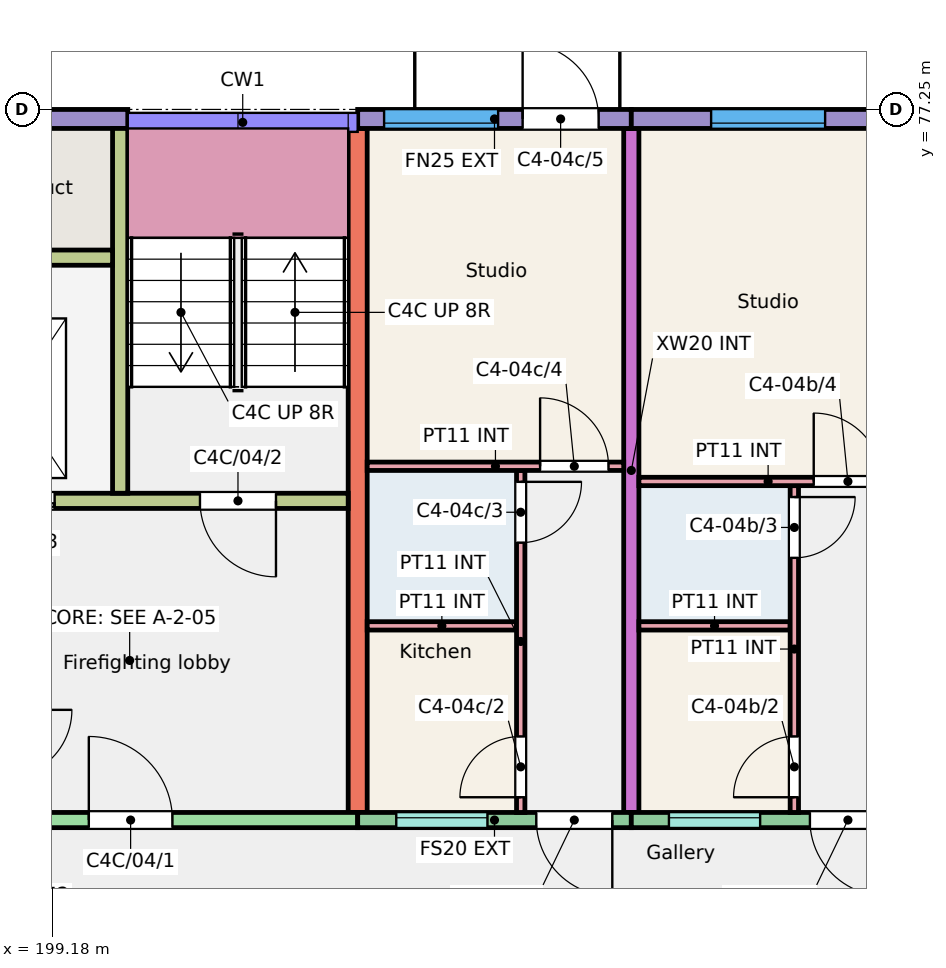
"""IFC4 building model, lengths in metres.
Left out: names, types, materials, properties, quantities, classifications, styles, units other than length and angle.
Written with IfcOpenShell. Run it as: python <this file> out.ifc"""

import sys

from ifc_helpers import new_model, si_unit, direction, frame, frame_2d, origin, place, context, subcontext, project, spatial, rectangle, extrude, element, fill, save


model = new_model("IFC4")
c1 = context("Model", 3, precision=1e-05, world=origin(), true_north=direction((0.0, 1.0)))
c2 = subcontext(c1, "Body", "Model", "MODEL_VIEW")
j1 = project(units=[si_unit("LENGTHUNIT", "METRE"), si_unit("PLANEANGLEUNIT", "RADIAN")], contexts=[c1])
p1 = place(None, origin())
s1 = spatial("IfcSite", under=j1, at=p1, CompositionType="ELEMENT")
p2 = place(p1, origin())
s2 = spatial("IfcBuilding", under=s1, at=p2, CompositionType="ELEMENT")
p3 = place(p2, frame((0.0, 0.0, 12.0)))
s3 = spatial("IfcBuildingStorey", under=s2, at=p3, CompositionType="ELEMENT", Elevation=12.0)
p4 = place(p3, frame((203.2, 68.0, 0.0), z_axis=(0.0, 0.0, 1.0), x_axis=(0.0, 1.0, 0.0)))
e1 = element("IfcWall", 1, at=p4, inside=s3, PredefinedType="SHEAR", context=c2, shape_type="SweptSolid", body=[
    extrude(rectangle(XDim=9.0, YDim=0.25, at=frame_2d((4.5, 0.0))), origin(), (0.0, 0.0, 1.0), 3.0),
])
p5 = place(p3, frame((206.8, 68.0, 0.0), z_axis=(0.0, 0.0, 1.0), x_axis=(0.0, 1.0, 0.0)))
e2 = element("IfcWall", 2, at=p5, inside=s3, PredefinedType="SHEAR", context=c2, shape_type="SweptSolid", body=[
    extrude(rectangle(XDim=9.0, YDim=0.2, at=frame_2d((4.5, 0.0))), origin(), (0.0, 0.0, 1.0), 3.0),
])
p6 = place(p3, frame((197.2, 77.125, 0.0), z_axis=(0.0, 0.0, 1.0), x_axis=(1.0, 0.0, 0.0)))
e3 = element("IfcWall", 3, at=p6, inside=s3, PredefinedType="SOLIDWALL", context=c2, shape_type="SweptSolid", body=[
    extrude(rectangle(XDim=2.975, YDim=0.25, at=frame_2d((1.488, 0.0))), origin(), (0.0, 0.0, 1.0), 3.0),
])
p7 = place(p3, frame((197.35, 67.9, 0.0), z_axis=(0.0, 0.0, 1.0), x_axis=(1.0, 0.0, 0.0)))
e4 = element("IfcWall", 4, at=p7, inside=s3, PredefinedType="SHEAR", context=c2, shape_type="SweptSolid", body=[
    extrude(rectangle(XDim=5.85, YDim=0.2, at=frame_2d((2.925, 0.0))), origin(), (0.0, 0.0, 1.0), 3.0),
])
p8 = place(p7, frame((2.312, 0.0, 0.0)))
e5 = element("IfcOpeningElement", 5, at=p8, cuts=e4, PredefinedType="OPENING", context=c2, shape_type="SweptSolid", body=[
    extrude(rectangle(XDim=1.1, YDim=2.1, at=frame_2d((0.55, 1.05))), frame((0.0, 0.11, 0.0), z_axis=(0.0, -1.0, 0.0), x_axis=(1.0, 0.0, 0.0)), (0.0, 0.0, 1.0), 0.22),
])
p9 = place(p3, frame((197.35, 72.1, 0.0), z_axis=(0.0, 0.0, 1.0), x_axis=(1.0, 0.0, 0.0)))
e6 = element("IfcWall", 6, at=p9, inside=s3, PredefinedType="SHEAR", context=c2, shape_type="SweptSolid", body=[
    extrude(rectangle(XDim=5.725, YDim=0.2, at=frame_2d((2.862, 0.0))), origin(), (0.0, 0.0, 1.0), 3.0),
])
p10 = place(p9, frame((3.775, 0.0, 0.0)))
e7 = element("IfcOpeningElement", 7, at=p10, cuts=e6, PredefinedType="OPENING", context=c2, shape_type="SweptSolid", body=[
    extrude(rectangle(XDim=1.0, YDim=2.1, at=frame_2d((0.5, 1.05))), frame((0.0, 0.11, 0.0), z_axis=(0.0, -1.0, 0.0), x_axis=(1.0, 0.0, 0.0)), (0.0, 0.0, 1.0), 0.22),
])
p11 = place(p9, frame((0.762, 0.0, 0.0)))
e8 = element("IfcOpeningElement", 8, at=p11, cuts=e6, PredefinedType="OPENING", context=c2, shape_type="SweptSolid", body=[
    extrude(rectangle(XDim=1.1, YDim=2.1, at=frame_2d((0.55, 1.05))), frame((0.0, 0.11, 0.0), z_axis=(0.0, -1.0, 0.0), x_axis=(1.0, 0.0, 0.0)), (0.0, 0.0, 1.0), 0.22),
])
p12 = place(p3, frame((200.075, 72.2, 0.0), z_axis=(0.0, 0.0, 1.0), x_axis=(0.0, 1.0, 0.0)))
e9 = element("IfcWall", 9, at=p12, inside=s3, PredefinedType="SHEAR", context=c2, shape_type="SweptSolid", body=[
    extrude(rectangle(XDim=4.8, YDim=0.2, at=frame_2d((2.4, 0.0))), origin(), (0.0, 0.0, 1.0), 3.0),
])
p13 = place(p3, frame((197.35, 75.3, 0.0), z_axis=(0.0, 0.0, 1.0), x_axis=(1.0, 0.0, 0.0)))
e10 = element("IfcWall", 10, at=p13, inside=s3, PredefinedType="SHEAR", context=c2, shape_type="SweptSolid", body=[
    extrude(rectangle(XDim=2.625, YDim=0.2, at=frame_2d((1.312, 0.0))), origin(), (0.0, 0.0, 1.0), 3.0),
])
p14 = place(p3, frame((203.2, 77.125, 0.0), z_axis=(0.0, 0.0, 1.0), x_axis=(1.0, 0.0, 0.0)))
e11 = element("IfcWall", 11, at=p14, inside=s3, PredefinedType="SOLIDWALL", context=c2, shape_type="SweptSolid", body=[
    extrude(rectangle(XDim=3.6, YDim=0.25, at=frame_2d((1.8, 0.0))), origin(), (0.0, 0.0, 1.0), 3.0),
])
p15 = place(p14, frame((0.347, 0.0, 0.9)))
e12 = element("IfcOpeningElement", 12, at=p15, cuts=e11, PredefinedType="OPENING", context=c2, shape_type="SweptSolid", body=[
    extrude(rectangle(XDim=1.5, YDim=1.5, at=frame_2d((0.75, 0.75))), frame((0.0, 0.135, 0.0), z_axis=(0.0, -1.0, 0.0), x_axis=(1.0, 0.0, 0.0)), (0.0, 0.0, 1.0), 0.27),
])
p16 = place(p14, frame((2.17, 0.0, 0.0)))
e13 = element("IfcOpeningElement", 13, at=p16, cuts=e11, PredefinedType="OPENING", context=c2, shape_type="SweptSolid", body=[
    extrude(rectangle(XDim=1.0, YDim=2.1, at=frame_2d((0.5, 1.05))), frame((0.0, 0.135, 0.0), z_axis=(0.0, -1.0, 0.0), x_axis=(1.0, 0.0, 0.0)), (0.0, 0.0, 1.0), 0.27),
])
p17 = place(p3, frame((203.2, 67.9, 0.0), z_axis=(0.0, 0.0, 1.0), x_axis=(1.0, 0.0, 0.0)))
e14 = element("IfcWall", 14, at=p17, inside=s3, PredefinedType="SOLIDWALL", context=c2, shape_type="SweptSolid", body=[
    extrude(rectangle(XDim=3.6, YDim=0.2, at=frame_2d((1.8, 0.0))), origin(), (0.0, 0.0, 1.0), 3.0),
])
p18 = place(p17, frame((0.508, 0.0, 1.1)))
e15 = element("IfcOpeningElement", 15, at=p18, cuts=e14, PredefinedType="OPENING", context=c2, shape_type="SweptSolid", body=[
    extrude(rectangle(XDim=1.2, YDim=1.3, at=frame_2d((0.6, 0.65))), frame((0.0, 0.11, 0.0), z_axis=(0.0, -1.0, 0.0), x_axis=(1.0, 0.0, 0.0)), (0.0, 0.0, 1.0), 0.22),
])
p19 = place(p17, frame((2.35, 0.0, 0.0)))
e16 = element("IfcOpeningElement", 16, at=p19, cuts=e14, PredefinedType="OPENING", context=c2, shape_type="SweptSolid", body=[
    extrude(rectangle(XDim=1.0, YDim=2.1, at=frame_2d((0.5, 1.05))), frame((0.0, 0.11, 0.0), z_axis=(0.0, -1.0, 0.0), x_axis=(1.0, 0.0, 0.0)), (0.0, 0.0, 1.0), 0.22),
])
p20 = place(p3, frame((206.8, 77.125, 0.0), z_axis=(0.0, 0.0, 1.0), x_axis=(1.0, 0.0, 0.0)))
e17 = element("IfcWall", 17, at=p20, inside=s3, PredefinedType="SOLIDWALL", context=c2, shape_type="SweptSolid", body=[
    extrude(rectangle(XDim=3.6, YDim=0.25, at=frame_2d((1.8, 0.0))), origin(), (0.0, 0.0, 1.0), 3.0),
])
p21 = place(p20, frame((1.05, 0.0, 0.9)))
e18 = element("IfcOpeningElement", 18, at=p21, cuts=e17, PredefinedType="OPENING", context=c2, shape_type="SweptSolid", body=[
    extrude(rectangle(XDim=1.5, YDim=1.5, at=frame_2d((0.75, 0.75))), frame((0.0, 0.135, 0.0), z_axis=(0.0, -1.0, 0.0), x_axis=(1.0, 0.0, 0.0)), (0.0, 0.0, 1.0), 0.27),
])
p22 = place(p3, frame((206.8, 67.9, 0.0), z_axis=(0.0, 0.0, 1.0), x_axis=(1.0, 0.0, 0.0)))
e19 = element("IfcWall", 19, at=p22, inside=s3, PredefinedType="SOLIDWALL", context=c2, shape_type="SweptSolid", body=[
    extrude(rectangle(XDim=3.6, YDim=0.2, at=frame_2d((1.8, 0.0))), origin(), (0.0, 0.0, 1.0), 3.0),
])
p23 = place(p22, frame((0.495, 0.0, 1.1)))
e20 = element("IfcOpeningElement", 20, at=p23, cuts=e19, PredefinedType="OPENING", context=c2, shape_type="SweptSolid", body=[
    extrude(rectangle(XDim=1.2, YDim=1.3, at=frame_2d((0.6, 0.65))), frame((0.0, 0.11, 0.0), z_axis=(0.0, -1.0, 0.0), x_axis=(1.0, 0.0, 0.0)), (0.0, 0.0, 1.0), 0.22),
])
p24 = place(p22, frame((2.35, 0.0, 0.0)))
e21 = element("IfcOpeningElement", 21, at=p24, cuts=e19, PredefinedType="OPENING", context=c2, shape_type="SweptSolid", body=[
    extrude(rectangle(XDim=1.0, YDim=2.1, at=frame_2d((0.5, 1.05))), frame((0.0, 0.11, 0.0), z_axis=(0.0, -1.0, 0.0), x_axis=(1.0, 0.0, 0.0)), (0.0, 0.0, 1.0), 0.22),
])
p25 = place(p3, frame((206.9, 70.455, 0.0), z_axis=(0.0, 0.0, 1.0), x_axis=(1.0, 0.0, 0.0)))
e22 = element("IfcWall", 22, at=p25, inside=s3, PredefinedType="PARTITIONING", context=c2, shape_type="SweptSolid", body=[
    extrude(rectangle(XDim=1.99, YDim=0.11, at=frame_2d((0.995, 0.0))), origin(), (0.0, 0.0, 1.0), 2.8),
])
p26 = place(p3, frame((208.945, 68.0, 0.0), z_axis=(0.0, 0.0, 1.0), x_axis=(0.0, 1.0, 0.0)))
e23 = element("IfcWall", 23, at=p26, inside=s3, PredefinedType="PARTITIONING", context=c2, shape_type="SweptSolid", body=[
    extrude(rectangle(XDim=4.3, YDim=0.11, at=frame_2d((2.15, 0.0))), origin(), (0.0, 0.0, 1.0), 2.8),
])
p27 = place(p26, frame((0.2, 0.0, 0.0)))
e24 = element("IfcOpeningElement", 24, at=p27, cuts=e23, PredefinedType="OPENING", context=c2, shape_type="SweptSolid", body=[
    extrude(rectangle(XDim=0.8, YDim=2.1, at=frame_2d((0.4, 1.05))), frame((0.0, 0.065, 0.0), z_axis=(0.0, -1.0, 0.0), x_axis=(1.0, 0.0, 0.0)), (0.0, 0.0, 1.0), 0.13),
])
p28 = place(p26, frame((3.35, 0.0, 0.0)))
e25 = element("IfcOpeningElement", 25, at=p28, cuts=e23, PredefinedType="OPENING", context=c2, shape_type="SweptSolid", body=[
    extrude(rectangle(XDim=0.8, YDim=2.1, at=frame_2d((0.4, 1.05))), frame((0.0, 0.065, 0.0), z_axis=(0.0, -1.0, 0.0), x_axis=(1.0, 0.0, 0.0)), (0.0, 0.0, 1.0), 0.13),
])
p29 = place(p3, frame((206.9, 72.355, 0.0), z_axis=(0.0, 0.0, 1.0), x_axis=(1.0, 0.0, 0.0)))
e26 = element("IfcWall", 26, at=p29, inside=s3, PredefinedType="PARTITIONING", context=c2, shape_type="SweptSolid", body=[
    extrude(rectangle(XDim=3.4, YDim=0.11, at=frame_2d((1.7, 0.0))), origin(), (0.0, 0.0, 1.0), 2.8),
])
p30 = place(p29, frame((2.3, 0.0, 0.0)))
e27 = element("IfcOpeningElement", 27, at=p30, cuts=e26, PredefinedType="OPENING", context=c2, shape_type="SweptSolid", body=[
    extrude(rectangle(XDim=0.9, YDim=2.1, at=frame_2d((0.45, 1.05))), frame((0.0, 0.065, 0.0), z_axis=(0.0, -1.0, 0.0), x_axis=(1.0, 0.0, 0.0)), (0.0, 0.0, 1.0), 0.13),
])
p31 = place(p3, frame((203.325, 70.455, 0.0), z_axis=(0.0, 0.0, 1.0), x_axis=(1.0, 0.0, 0.0)))
e28 = element("IfcWall", 28, at=p31, inside=s3, PredefinedType="PARTITIONING", context=c2, shape_type="SweptSolid", body=[
    extrude(rectangle(XDim=1.965, YDim=0.11, at=frame_2d((0.982, 0.0))), origin(), (0.0, 0.0, 1.0), 2.8),
])
p32 = place(p3, frame((205.345, 68.0, 0.0), z_axis=(0.0, 0.0, 1.0), x_axis=(0.0, 1.0, 0.0)))
e29 = element("IfcWall", 29, at=p32, inside=s3, PredefinedType="PARTITIONING", context=c2, shape_type="SweptSolid", body=[
    extrude(rectangle(XDim=4.5, YDim=0.11, at=frame_2d((2.25, 0.0))), origin(), (0.0, 0.0, 1.0), 2.8),
])
p33 = place(p32, frame((0.2, 0.0, 0.0)))
e30 = element("IfcOpeningElement", 30, at=p33, cuts=e29, PredefinedType="OPENING", context=c2, shape_type="SweptSolid", body=[
    extrude(rectangle(XDim=0.8, YDim=2.1, at=frame_2d((0.4, 1.05))), frame((0.0, 0.065, 0.0), z_axis=(0.0, -1.0, 0.0), x_axis=(1.0, 0.0, 0.0)), (0.0, 0.0, 1.0), 0.13),
])
p34 = place(p32, frame((3.55, 0.0, 0.0)))
e31 = element("IfcOpeningElement", 31, at=p34, cuts=e29, PredefinedType="OPENING", context=c2, shape_type="SweptSolid", body=[
    extrude(rectangle(XDim=0.8, YDim=2.1, at=frame_2d((0.4, 1.05))), frame((0.0, 0.065, 0.0), z_axis=(0.0, -1.0, 0.0), x_axis=(1.0, 0.0, 0.0)), (0.0, 0.0, 1.0), 0.13),
])
p35 = place(p3, frame((203.325, 72.555, 0.0), z_axis=(0.0, 0.0, 1.0), x_axis=(1.0, 0.0, 0.0)))
e32 = element("IfcWall", 32, at=p35, inside=s3, PredefinedType="PARTITIONING", context=c2, shape_type="SweptSolid", body=[
    extrude(rectangle(XDim=3.375, YDim=0.11, at=frame_2d((1.688, 0.0))), origin(), (0.0, 0.0, 1.0), 2.8),
])
p36 = place(p35, frame((2.275, 0.0, 0.0)))
e33 = element("IfcOpeningElement", 33, at=p36, cuts=e32, PredefinedType="OPENING", context=c2, shape_type="SweptSolid", body=[
    extrude(rectangle(XDim=0.9, YDim=2.1, at=frame_2d((0.45, 1.05))), frame((0.0, 0.065, 0.0), z_axis=(0.0, -1.0, 0.0), x_axis=(1.0, 0.0, 0.0)), (0.0, 0.0, 1.0), 0.13),
])
p37 = place(p23, origin())
e34 = element("IfcWindow", 34, at=p37, inside=s3, PartitioningType="SINGLE_PANEL", PredefinedType="WINDOW", context=c2, shape_type="SweptSolid", body=[
    extrude(rectangle(XDim=1.2, YDim=1.3, at=frame_2d((0.6, 0.65))), frame((0.0, 0.06, 0.0), z_axis=(0.0, -1.0, 0.0), x_axis=(1.0, 0.0, 0.0)), (0.0, 0.0, 1.0), 0.06),
])
fill(e20, e34)
p38 = place(p21, origin())
e35 = element("IfcWindow", 35, at=p38, inside=s3, PartitioningType="SINGLE_PANEL", PredefinedType="WINDOW", context=c2, shape_type="SweptSolid", body=[
    extrude(rectangle(XDim=1.5, YDim=1.5, at=frame_2d((0.75, 0.75))), frame((0.0, -0.025, 0.0), z_axis=(0.0, -1.0, 0.0), x_axis=(1.0, 0.0, 0.0)), (0.0, 0.0, 1.0), 0.06),
])
fill(e18, e35)
p39 = place(p18, origin())
e36 = element("IfcWindow", 36, at=p39, inside=s3, PartitioningType="SINGLE_PANEL", PredefinedType="WINDOW", context=c2, shape_type="SweptSolid", body=[
    extrude(rectangle(XDim=1.2, YDim=1.3, at=frame_2d((0.6, 0.65))), frame((0.0, 0.06, 0.0), z_axis=(0.0, -1.0, 0.0), x_axis=(1.0, 0.0, 0.0)), (0.0, 0.0, 1.0), 0.06),
])
fill(e15, e36)
p40 = place(p15, origin())
e37 = element("IfcWindow", 37, at=p40, inside=s3, PartitioningType="SINGLE_PANEL", PredefinedType="WINDOW", context=c2, shape_type="SweptSolid", body=[
    extrude(rectangle(XDim=1.5, YDim=1.5, at=frame_2d((0.75, 0.75))), frame((0.0, -0.025, 0.0), z_axis=(0.0, -1.0, 0.0), x_axis=(1.0, 0.0, 0.0)), (0.0, 0.0, 1.0), 0.06),
])
fill(e12, e37)
p41 = place(p24, origin())
e38 = element("IfcDoor", 38, at=p41, inside=s3, OperationType="SINGLE_SWING_RIGHT", PredefinedType="DOOR", context=c2, shape_type="SweptSolid", body=[
    extrude(rectangle(XDim=1.0, YDim=2.1, at=frame_2d((0.5, 1.05))), frame((0.0, 0.025, 0.0), z_axis=(0.0, -1.0, 0.0), x_axis=(1.0, 0.0, 0.0)), (0.0, 0.0, 1.0), 0.05),
])
fill(e21, e38)
p42 = place(p27, origin())
e39 = element("IfcDoor", 39, at=p42, inside=s3, OperationType="SINGLE_SWING_LEFT", PredefinedType="DOOR", context=c2, shape_type="SweptSolid", body=[
    extrude(rectangle(XDim=0.8, YDim=2.1, at=frame_2d((0.4, 1.05))), frame((0.0, 0.025, 0.0), z_axis=(0.0, -1.0, 0.0), x_axis=(1.0, 0.0, 0.0)), (0.0, 0.0, 1.0), 0.05),
])
fill(e24, e39)
p43 = place(p28, origin())
e40 = element("IfcDoor", 40, at=p43, inside=s3, OperationType="SINGLE_SWING_RIGHT", PredefinedType="DOOR", context=c2, shape_type="SweptSolid", body=[
    extrude(rectangle(XDim=0.8, YDim=2.1, at=frame_2d((0.4, 1.05))), frame((0.0, 0.025, 0.0), z_axis=(0.0, -1.0, 0.0), x_axis=(1.0, 0.0, 0.0)), (0.0, 0.0, 1.0), 0.05),
])
fill(e25, e40)
p44 = place(p30, origin())
e41 = element("IfcDoor", 41, at=p44, inside=s3, OperationType="SINGLE_SWING_LEFT", PredefinedType="DOOR", context=c2, shape_type="SweptSolid", body=[
    extrude(rectangle(XDim=0.9, YDim=2.1, at=frame_2d((0.45, 1.05))), frame((0.0, 0.025, 0.0), z_axis=(0.0, -1.0, 0.0), x_axis=(1.0, 0.0, 0.0)), (0.0, 0.0, 1.0), 0.05),
])
fill(e27, e41)
p45 = place(p19, origin())
e42 = element("IfcDoor", 42, at=p45, inside=s3, OperationType="SINGLE_SWING_RIGHT", PredefinedType="DOOR", context=c2, shape_type="SweptSolid", body=[
    extrude(rectangle(XDim=1.0, YDim=2.1, at=frame_2d((0.5, 1.05))), frame((0.0, 0.025, 0.0), z_axis=(0.0, -1.0, 0.0), x_axis=(1.0, 0.0, 0.0)), (0.0, 0.0, 1.0), 0.05),
])
fill(e16, e42)
p46 = place(p33, origin())
e43 = element("IfcDoor", 43, at=p46, inside=s3, OperationType="SINGLE_SWING_LEFT", PredefinedType="DOOR", context=c2, shape_type="SweptSolid", body=[
    extrude(rectangle(XDim=0.8, YDim=2.1, at=frame_2d((0.4, 1.05))), frame((0.0, 0.025, 0.0), z_axis=(0.0, -1.0, 0.0), x_axis=(1.0, 0.0, 0.0)), (0.0, 0.0, 1.0), 0.05),
])
fill(e30, e43)
p47 = place(p34, origin())
e44 = element("IfcDoor", 44, at=p47, inside=s3, OperationType="SINGLE_SWING_RIGHT", PredefinedType="DOOR", context=c2, shape_type="SweptSolid", body=[
    extrude(rectangle(XDim=0.8, YDim=2.1, at=frame_2d((0.4, 1.05))), frame((0.0, 0.025, 0.0), z_axis=(0.0, -1.0, 0.0), x_axis=(1.0, 0.0, 0.0)), (0.0, 0.0, 1.0), 0.05),
])
fill(e31, e44)
p48 = place(p36, origin())
e45 = element("IfcDoor", 45, at=p48, inside=s3, OperationType="SINGLE_SWING_LEFT", PredefinedType="DOOR", context=c2, shape_type="SweptSolid", body=[
    extrude(rectangle(XDim=0.9, YDim=2.1, at=frame_2d((0.45, 1.05))), frame((0.0, 0.025, 0.0), z_axis=(0.0, -1.0, 0.0), x_axis=(1.0, 0.0, 0.0)), (0.0, 0.0, 1.0), 0.05),
])
fill(e33, e45)
p49 = place(p16, origin())
e46 = element("IfcDoor", 46, at=p49, inside=s3, OperationType="SINGLE_SWING_LEFT", PredefinedType="DOOR", context=c2, shape_type="SweptSolid", body=[
    extrude(rectangle(XDim=1.0, YDim=2.1, at=frame_2d((0.5, 1.05))), frame((0.0, 0.025, 0.0), z_axis=(0.0, -1.0, 0.0), x_axis=(1.0, 0.0, 0.0)), (0.0, 0.0, 1.0), 0.05),
])
fill(e13, e46)
p50 = place(p8, origin())
e47 = element("IfcDoor", 47, at=p50, inside=s3, OperationType="SINGLE_SWING_LEFT", PredefinedType="DOOR", context=c2, shape_type="SweptSolid", body=[
    extrude(rectangle(XDim=1.1, YDim=2.1, at=frame_2d((0.55, 1.05))), frame((0.0, 0.025, 0.0), z_axis=(0.0, -1.0, 0.0), x_axis=(1.0, 0.0, 0.0)), (0.0, 0.0, 1.0), 0.05),
])
fill(e5, e47)
p51 = place(p10, origin())
e48 = element("IfcDoor", 48, at=p51, inside=s3, OperationType="SINGLE_SWING_RIGHT", PredefinedType="DOOR", context=c2, shape_type="SweptSolid", body=[
    extrude(rectangle(XDim=1.0, YDim=2.1, at=frame_2d((0.5, 1.05))), frame((0.0, 0.025, 0.0), z_axis=(0.0, -1.0, 0.0), x_axis=(1.0, 0.0, 0.0)), (0.0, 0.0, 1.0), 0.05),
])
fill(e7, e48)
p52 = place(p11, origin())
e49 = element("IfcDoor", 49, at=p52, inside=s3, OperationType="DOUBLE_DOOR_SLIDING", PredefinedType="DOOR", context=c2, shape_type="SweptSolid", body=[
    extrude(rectangle(XDim=1.1, YDim=2.1, at=frame_2d((0.55, 1.05))), frame((0.0, 0.025, 0.0), z_axis=(0.0, -1.0, 0.0), x_axis=(1.0, 0.0, 0.0)), (0.0, 0.0, 1.0), 0.05),
])
fill(e8, e49)
save(model, sys.argv[1])
